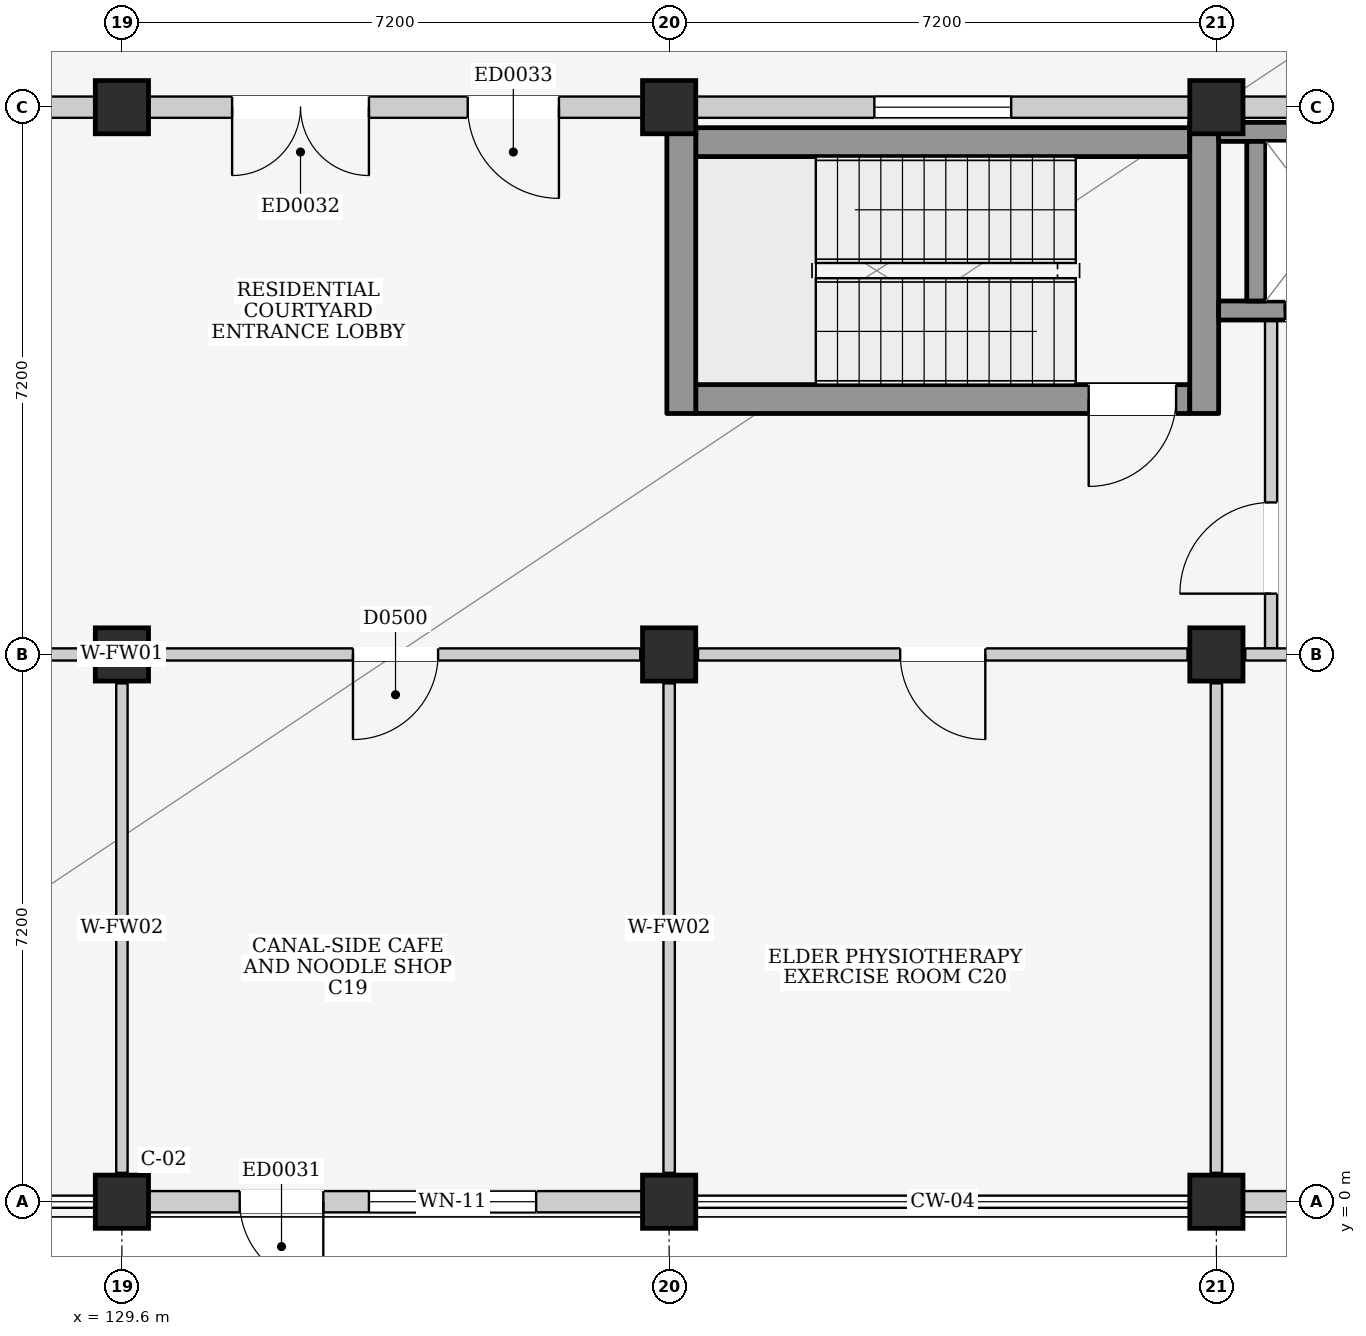
"""IFC4 building model, lengths in metres.
Left out: names, types, materials, properties, quantities, classifications, styles, units other than length and angle.
Written with IfcOpenShell. Run it as: python <this file> out.ifc"""

import sys

from ifc_helpers import new_model, si_unit, direction, frame, frame_2d, origin, origin_2d, place, context, subcontext, project, spatial, rectangle, extrude, element, fill, save


model = new_model("IFC4")
c1 = context("Model", 3, precision=1e-05, world=origin(), true_north=direction((0.0, 1.0)))
c2 = subcontext(c1, "Body", "Model", "MODEL_VIEW")
j1 = project(units=[si_unit("LENGTHUNIT", "METRE"), si_unit("PLANEANGLEUNIT", "RADIAN")], contexts=[c1])
p1 = place(None, origin())
s1 = spatial("IfcSite", under=j1, at=p1, CompositionType="ELEMENT")
p2 = place(p1, origin())
s2 = spatial("IfcBuilding", under=s1, at=p2, CompositionType="ELEMENT")
p3 = place(p2, origin())
s3 = spatial("IfcBuildingStorey", under=s2, at=p3, CompositionType="ELEMENT", Elevation=0.0)
for number, where, z_axis, x_axis in (
    (1, (129.6, 0.0, 0.0), (0.0, 0.0, 1.0), (1.0, 0.0, 0.0)),
    (2, (129.6, 7.2, 0.0), (0.0, 0.0, 1.0), (1.0, 0.0, 0.0)),
    (3, (129.6, 14.4, 0.0), (0.0, 0.0, 1.0), (1.0, 0.0, 0.0)),
    (4, (136.8, 0.0, 0.0), (0.0, 0.0, 1.0), (1.0, 0.0, 0.0)),
    (5, (136.8, 7.2, 0.0), (0.0, 0.0, 1.0), (1.0, 0.0, 0.0)),
    (6, (136.8, 14.4, 0.0), (0.0, 0.0, 1.0), (1.0, 0.0, 0.0)),
    (7, (144.0, 0.0, 0.0), (0.0, 0.0, 1.0), (1.0, 0.0, 0.0)),
    (8, (144.0, 7.2, 0.0), (0.0, 0.0, 1.0), (1.0, 0.0, 0.0)),
    (9, (144.0, 14.4, 0.0), (0.0, 0.0, 1.0), (1.0, 0.0, 0.0)),
):
    element("IfcColumn", number, at=place(p3, frame(where, z_axis=z_axis, x_axis=x_axis)), inside=s3, PredefinedType="COLUMN", context=c2, shape_type="SweptSolid", body=[
        extrude(rectangle(XDim=0.7, YDim=0.7, at=origin_2d()), origin(), (0.0, 0.0, 1.0), 4.5),
    ])
p4 = place(p3, frame((122.75, 14.4, 0.0), z_axis=(0.0, 0.0, 1.0), x_axis=(1.0, 0.0, 0.0)))
e10 = element("IfcWall", 10, at=p4, inside=s3, PredefinedType="ELEMENTEDWALL", context=c2, shape_type="SweptSolid", body=[
    extrude(rectangle(XDim=6.5, YDim=0.28, at=frame_2d((3.25, 0.0))), origin(), (0.0, 0.0, 1.0), 3.435),
])
p5 = place(p4, frame((2.225, 0.0, 0.95)))
e11 = element("IfcOpeningElement", 11, at=p5, cuts=e10, PredefinedType="OPENING", context=c2, shape_type="SweptSolid", body=[
    extrude(rectangle(XDim=2.05, YDim=1.6, at=frame_2d((1.025, 0.8))), frame((0.0, 0.155, 0.0), z_axis=(0.0, -1.0, 0.0), x_axis=(1.0, 0.0, 0.0)), (0.0, 0.0, 1.0), 0.31),
])
p6 = place(p3, frame((129.95, 0.0, 0.0), z_axis=(0.0, 0.0, 1.0), x_axis=(1.0, 0.0, 0.0)))
e12 = element("IfcWall", 12, at=p6, inside=s3, PredefinedType="ELEMENTEDWALL", context=c2, shape_type="SweptSolid", body=[
    extrude(rectangle(XDim=6.5, YDim=0.28, at=frame_2d((3.25, 0.0))), origin(), (0.0, 0.0, 1.0), 3.665),
])
p7 = place(p6, frame((1.2, 0.0, 0.0)))
e13 = element("IfcOpeningElement", 13, at=p7, cuts=e12, PredefinedType="OPENING", context=c2, shape_type="SweptSolid", body=[
    extrude(rectangle(XDim=1.1, YDim=2.2, at=frame_2d((0.55, 1.1))), frame((0.0, 0.155, 0.0), z_axis=(0.0, -1.0, 0.0), x_axis=(1.0, 0.0, 0.0)), (0.0, 0.0, 1.0), 0.31),
])
p8 = place(p6, frame((2.9, 0.0, 0.85)))
e14 = element("IfcOpeningElement", 14, at=p8, cuts=e12, PredefinedType="OPENING", context=c2, shape_type="SweptSolid", body=[
    extrude(rectangle(XDim=2.2, YDim=1.8, at=frame_2d((1.1, 0.9))), frame((0.0, 0.155, 0.0), z_axis=(0.0, -1.0, 0.0), x_axis=(1.0, 0.0, 0.0)), (0.0, 0.0, 1.0), 0.31),
])
p9 = place(p3, frame((129.95, 14.4, 0.0), z_axis=(0.0, 0.0, 1.0), x_axis=(1.0, 0.0, 0.0)))
e15 = element("IfcWall", 15, at=p9, inside=s3, PredefinedType="ELEMENTEDWALL", context=c2, shape_type="SweptSolid", body=[
    extrude(rectangle(XDim=6.5, YDim=0.28, at=frame_2d((3.25, 0.0))), origin(), (0.0, 0.0, 1.0), 3.435),
])
p10 = place(p9, frame((1.1, 0.0, 0.0)))
e16 = element("IfcOpeningElement", 16, at=p10, cuts=e15, PredefinedType="OPENING", context=c2, shape_type="SweptSolid", body=[
    extrude(rectangle(XDim=1.8, YDim=2.4, at=frame_2d((0.9, 1.2))), frame((0.0, 0.155, 0.0), z_axis=(0.0, -1.0, 0.0), x_axis=(1.0, 0.0, 0.0)), (0.0, 0.0, 1.0), 0.31),
])
p11 = place(p9, frame((4.2, 0.0, 0.0)))
e17 = element("IfcOpeningElement", 17, at=p11, cuts=e15, PredefinedType="OPENING", context=c2, shape_type="SweptSolid", body=[
    extrude(rectangle(XDim=1.2, YDim=2.15, at=frame_2d((0.6, 1.075))), frame((0.0, 0.155, 0.0), z_axis=(0.0, -1.0, 0.0), x_axis=(1.0, 0.0, 0.0)), (0.0, 0.0, 1.0), 0.31),
])
p12 = place(p3, frame((137.15, 14.4, 0.0), z_axis=(0.0, 0.0, 1.0), x_axis=(1.0, 0.0, 0.0)))
e18 = element("IfcWall", 18, at=p12, inside=s3, PredefinedType="ELEMENTEDWALL", context=c2, shape_type="SweptSolid", body=[
    extrude(rectangle(XDim=6.5, YDim=0.28, at=frame_2d((3.25, 0.0))), origin(), (0.0, 0.0, 1.0), 3.435),
])
p13 = place(p12, frame((2.35, 0.0, 0.95)))
e19 = element("IfcOpeningElement", 19, at=p13, cuts=e18, PredefinedType="OPENING", context=c2, shape_type="SweptSolid", body=[
    extrude(rectangle(XDim=1.8, YDim=1.5, at=frame_2d((0.9, 0.75))), frame((0.0, 0.155, 0.0), z_axis=(0.0, -1.0, 0.0), x_axis=(1.0, 0.0, 0.0)), (0.0, 0.0, 1.0), 0.31),
])
p14 = place(p3, frame((144.35, 0.0, 0.0), z_axis=(0.0, 0.0, 1.0), x_axis=(1.0, 0.0, 0.0)))
e20 = element("IfcWall", 20, at=p14, inside=s3, PredefinedType="ELEMENTEDWALL", context=c2, shape_type="SweptSolid", body=[
    extrude(rectangle(XDim=6.5, YDim=0.28, at=frame_2d((3.25, 0.0))), origin(), (0.0, 0.0, 1.0), 3.665),
])
p15 = place(p14, frame((2.35, 0.0, 0.95)))
e21 = element("IfcOpeningElement", 21, at=p15, cuts=e20, PredefinedType="OPENING", context=c2, shape_type="SweptSolid", body=[
    extrude(rectangle(XDim=1.8, YDim=1.5, at=frame_2d((0.9, 0.75))), frame((0.0, 0.155, 0.0), z_axis=(0.0, -1.0, 0.0), x_axis=(1.0, 0.0, 0.0)), (0.0, 0.0, 1.0), 0.31),
])
p16 = place(p3, frame((144.35, 14.4, 0.0), z_axis=(0.0, 0.0, 1.0), x_axis=(1.0, 0.0, 0.0)))
e22 = element("IfcWall", 22, at=p16, inside=s3, PredefinedType="ELEMENTEDWALL", context=c2, shape_type="SweptSolid", body=[
    extrude(rectangle(XDim=6.5, YDim=0.28, at=frame_2d((3.25, 0.0))), origin(), (0.0, 0.0, 1.0), 3.435),
])
p17 = place(p16, frame((2.5, 0.0, 0.95)))
e23 = element("IfcOpeningElement", 23, at=p17, cuts=e22, PredefinedType="OPENING", context=c2, shape_type="SweptSolid", body=[
    extrude(rectangle(XDim=1.5, YDim=1.5, at=frame_2d((0.75, 0.75))), frame((0.0, 0.155, 0.0), z_axis=(0.0, -1.0, 0.0), x_axis=(1.0, 0.0, 0.0)), (0.0, 0.0, 1.0), 0.31),
])
p18 = place(p3, frame((137.15, 10.56, 0.0), z_axis=(0.0, 0.0, 1.0), x_axis=(1.0, 0.0, 0.0)))
e24 = element("IfcWall", 24, at=p18, inside=s3, PredefinedType="SHEAR", context=c2, shape_type="SweptSolid", body=[
    extrude(rectangle(XDim=6.5, YDim=0.38, at=frame_2d((3.25, 0.0))), origin(), (0.0, 0.0, 1.0), 4.2),
])
p19 = place(p18, frame((5.17, 0.0, 0.0)))
e25 = element("IfcOpeningElement", 25, at=p19, cuts=e24, PredefinedType="OPENING", context=c2, shape_type="SweptSolid", body=[
    extrude(rectangle(XDim=1.15, YDim=2.2, at=frame_2d((0.575, 1.1))), frame((0.0, 0.205, 0.0), z_axis=(0.0, -1.0, 0.0), x_axis=(1.0, 0.0, 0.0)), (0.0, 0.0, 1.0), 0.41),
])
p20 = place(p3, frame((137.15, 13.94, 0.0), z_axis=(0.0, 0.0, 1.0), x_axis=(1.0, 0.0, 0.0)))
e26 = element("IfcWall", 26, at=p20, inside=s3, PredefinedType="SHEAR", context=c2, shape_type="SweptSolid", body=[
    extrude(rectangle(XDim=6.5, YDim=0.38, at=frame_2d((3.25, 0.0))), origin(), (0.0, 0.0, 1.0), 4.2),
])
p21 = place(p3, frame((136.96, 10.37, 0.0), z_axis=(0.0, 0.0, 1.0), x_axis=(0.0, 1.0, 0.0)))
e27 = element("IfcWall", 27, at=p21, inside=s3, PredefinedType="SHEAR", context=c2, shape_type="SweptSolid", body=[
    extrude(rectangle(XDim=3.76, YDim=0.38, at=frame_2d((1.88, 0.0))), origin(), (0.0, 0.0, 1.0), 4.2),
])
p22 = place(p3, frame((143.84, 10.37, 0.0), z_axis=(0.0, 0.0, 1.0), x_axis=(0.0, 1.0, 0.0)))
e28 = element("IfcWall", 28, at=p22, inside=s3, PredefinedType="SHEAR", context=c2, shape_type="SweptSolid", body=[
    extrude(rectangle(XDim=3.83, YDim=0.38, at=frame_2d((1.915, 0.0))), origin(), (0.0, 0.0, 1.0), 4.2),
])
p23 = place(p3, frame((144.72, 7.28, 0.0), z_axis=(0.0, 0.0, 1.0), x_axis=(0.0, 1.0, 0.0)))
e29 = element("IfcWall", 29, at=p23, inside=s3, PredefinedType="PARTITIONING", context=c2, shape_type="SweptSolid", body=[
    extrude(rectangle(XDim=4.32, YDim=0.16, at=frame_2d((2.16, 0.0))), origin(), (0.0, 0.0, 1.0), 4.2),
])
p24 = place(p23, frame((0.72, 0.0, 0.0)))
e30 = element("IfcOpeningElement", 30, at=p24, cuts=e29, PredefinedType="OPENING", context=c2, shape_type="SweptSolid", body=[
    extrude(rectangle(XDim=1.2, YDim=2.2, at=frame_2d((0.6, 1.1))), frame((0.0, 0.095, 0.0), z_axis=(0.0, -1.0, 0.0), x_axis=(1.0, 0.0, 0.0)), (0.0, 0.0, 1.0), 0.19),
])
p25 = place(p3, frame((144.03, 11.725, 0.0), z_axis=(0.0, 0.0, 1.0), x_axis=(1.0, 0.0, 0.0)))
e31 = element("IfcWall", 31, at=p25, inside=s3, PredefinedType="SHEAR", context=c2, shape_type="SweptSolid", body=[
    extrude(rectangle(XDim=2.47, YDim=0.25, at=frame_2d((1.235, 0.0))), origin(), (0.0, 0.0, 1.0), 4.2),
])
p26 = place(p25, frame((0.87, 0.0, 0.0)))
e32 = element("IfcOpeningElement", 32, at=p26, cuts=e31, PredefinedType="OPENING", context=c2, shape_type="SweptSolid", body=[
    extrude(rectangle(XDim=1.1, YDim=2.15, at=frame_2d((0.55, 1.075))), frame((0.0, 0.14, 0.0), z_axis=(0.0, -1.0, 0.0), x_axis=(1.0, 0.0, 0.0)), (0.0, 0.0, 1.0), 0.28),
])
p27 = place(p3, frame((144.03, 14.075, 0.0), z_axis=(0.0, 0.0, 1.0), x_axis=(1.0, 0.0, 0.0)))
e33 = element("IfcWall", 33, at=p27, inside=s3, PredefinedType="SHEAR", context=c2, shape_type="SweptSolid", body=[
    extrude(rectangle(XDim=2.47, YDim=0.25, at=frame_2d((1.235, 0.0))), origin(), (0.0, 0.0, 1.0), 4.2),
])
p28 = place(p3, frame((144.525, 11.85, 0.0), z_axis=(0.0, 0.0, 1.0), x_axis=(0.0, 1.0, 0.0)))
e34 = element("IfcWall", 34, at=p28, inside=s3, PredefinedType="SHEAR", context=c2, shape_type="SweptSolid", body=[
    extrude(rectangle(XDim=2.1, YDim=0.25, at=frame_2d((1.05, 0.0))), origin(), (0.0, 0.0, 1.0), 4.2),
])
p29 = place(p3, frame((122.78, 7.2, 0.0), z_axis=(0.0, 0.0, 1.0), x_axis=(1.0, 0.0, 0.0)))
e35 = element("IfcWall", 35, at=p29, inside=s3, PredefinedType="PARTITIONING", context=c2, shape_type="SweptSolid", body=[
    extrude(rectangle(XDim=6.44, YDim=0.16, at=frame_2d((3.22, 0.0))), origin(), (0.0, 0.0, 1.0), 3.435),
])
p30 = place(p29, frame((2.76, 0.0, 0.0)))
e36 = element("IfcOpeningElement", 36, at=p30, cuts=e35, PredefinedType="OPENING", context=c2, shape_type="SweptSolid", body=[
    extrude(rectangle(XDim=1.12, YDim=2.2, at=frame_2d((0.56, 1.1))), frame((0.0, 0.095, 0.0), z_axis=(0.0, -1.0, 0.0), x_axis=(1.0, 0.0, 0.0)), (0.0, 0.0, 1.0), 0.19),
])
p31 = place(p3, frame((129.6, 0.38, 0.0), z_axis=(0.0, 0.0, 1.0), x_axis=(0.0, 1.0, 0.0)))
e37 = element("IfcWall", 37, at=p31, inside=s3, PredefinedType="PARTITIONING", context=c2, shape_type="SweptSolid", body=[
    extrude(rectangle(XDim=6.44, YDim=0.15, at=frame_2d((3.22, 0.0))), origin(), (0.0, 0.0, 1.0), 3.435),
])
p32 = place(p3, frame((129.98, 7.2, 0.0), z_axis=(0.0, 0.0, 1.0), x_axis=(1.0, 0.0, 0.0)))
e38 = element("IfcWall", 38, at=p32, inside=s3, PredefinedType="PARTITIONING", context=c2, shape_type="SweptSolid", body=[
    extrude(rectangle(XDim=6.44, YDim=0.16, at=frame_2d((3.22, 0.0))), origin(), (0.0, 0.0, 1.0), 3.435),
])
p33 = place(p32, frame((2.66, 0.0, 0.0)))
e39 = element("IfcOpeningElement", 39, at=p33, cuts=e38, PredefinedType="OPENING", context=c2, shape_type="SweptSolid", body=[
    extrude(rectangle(XDim=1.12, YDim=2.2, at=frame_2d((0.56, 1.1))), frame((0.0, 0.095, 0.0), z_axis=(0.0, -1.0, 0.0), x_axis=(1.0, 0.0, 0.0)), (0.0, 0.0, 1.0), 0.19),
])
p34 = place(p3, frame((136.8, 0.38, 0.0), z_axis=(0.0, 0.0, 1.0), x_axis=(0.0, 1.0, 0.0)))
e40 = element("IfcWall", 40, at=p34, inside=s3, PredefinedType="PARTITIONING", context=c2, shape_type="SweptSolid", body=[
    extrude(rectangle(XDim=6.44, YDim=0.15, at=frame_2d((3.22, 0.0))), origin(), (0.0, 0.0, 1.0), 3.435),
])
p35 = place(p3, frame((137.18, 7.2, 0.0), z_axis=(0.0, 0.0, 1.0), x_axis=(1.0, 0.0, 0.0)))
e41 = element("IfcWall", 41, at=p35, inside=s3, PredefinedType="PARTITIONING", context=c2, shape_type="SweptSolid", body=[
    extrude(rectangle(XDim=6.44, YDim=0.16, at=frame_2d((3.22, 0.0))), origin(), (0.0, 0.0, 1.0), 3.435),
])
p36 = place(p35, frame((2.66, 0.0, 0.0)))
e42 = element("IfcOpeningElement", 42, at=p36, cuts=e41, PredefinedType="OPENING", context=c2, shape_type="SweptSolid", body=[
    extrude(rectangle(XDim=1.12, YDim=2.2, at=frame_2d((0.56, 1.1))), frame((0.0, 0.095, 0.0), z_axis=(0.0, -1.0, 0.0), x_axis=(1.0, 0.0, 0.0)), (0.0, 0.0, 1.0), 0.19),
])
p37 = place(p3, frame((144.0, 0.38, 0.0), z_axis=(0.0, 0.0, 1.0), x_axis=(0.0, 1.0, 0.0)))
e43 = element("IfcWall", 43, at=p37, inside=s3, PredefinedType="PARTITIONING", context=c2, shape_type="SweptSolid", body=[
    extrude(rectangle(XDim=6.44, YDim=0.15, at=frame_2d((3.22, 0.0))), origin(), (0.0, 0.0, 1.0), 3.435),
])
p38 = place(p3, frame((144.38, 7.2, 0.0), z_axis=(0.0, 0.0, 1.0), x_axis=(1.0, 0.0, 0.0)))
e44 = element("IfcWall", 44, at=p38, inside=s3, PredefinedType="PARTITIONING", context=c2, shape_type="SweptSolid", body=[
    extrude(rectangle(XDim=6.44, YDim=0.16, at=frame_2d((3.22, 0.0))), origin(), (0.0, 0.0, 1.0), 3.435),
])
p39 = place(p38, frame((2.66, 0.0, 0.0)))
e45 = element("IfcOpeningElement", 45, at=p39, cuts=e44, PredefinedType="OPENING", context=c2, shape_type="SweptSolid", body=[
    extrude(rectangle(XDim=1.12, YDim=2.2, at=frame_2d((0.56, 1.1))), frame((0.0, 0.095, 0.0), z_axis=(0.0, -1.0, 0.0), x_axis=(1.0, 0.0, 0.0)), (0.0, 0.0, 1.0), 0.19),
])
p40 = place(p7, frame((1.1, 0.0, 0.0), z_axis=(0.0, 0.0, 1.0), x_axis=(-1.0, 0.0, 0.0)))
e46 = element("IfcDoor", 46, at=p40, inside=s3, OperationType="SINGLE_SWING_LEFT", PredefinedType="DOOR", context=c2, shape_type="SweptSolid", body=[
    extrude(rectangle(XDim=1.1, YDim=2.2, at=frame_2d((0.55, 1.1))), frame((0.0, 0.025, 0.0), z_axis=(0.0, -1.0, 0.0), x_axis=(1.0, 0.0, 0.0)), (0.0, 0.0, 1.0), 0.05),
])
fill(e13, e46)
p41 = place(p8, origin())
e47 = element("IfcWindow", 47, at=p41, inside=s3, PartitioningType="TRIPLE_PANEL_VERTICAL", PredefinedType="WINDOW", context=c2, shape_type="SweptSolid", body=[
    extrude(rectangle(XDim=2.2, YDim=1.8, at=frame_2d((1.1, 0.9))), frame((0.0, 0.03, 0.0), z_axis=(0.0, -1.0, 0.0), x_axis=(1.0, 0.0, 0.0)), (0.0, 0.0, 1.0), 0.06),
])
fill(e14, e47)
p42 = place(p10, frame((1.8, 0.0, 0.0), z_axis=(0.0, 0.0, 1.0), x_axis=(-1.0, 0.0, 0.0)))
e48 = element("IfcDoor", 48, at=p42, inside=s3, OperationType="DOUBLE_DOOR_SINGLE_SWING", PredefinedType="DOOR", context=c2, shape_type="SweptSolid", body=[
    extrude(rectangle(XDim=1.8, YDim=2.4, at=frame_2d((0.9, 1.2))), frame((0.0, 0.025, 0.0), z_axis=(0.0, -1.0, 0.0), x_axis=(1.0, 0.0, 0.0)), (0.0, 0.0, 1.0), 0.05),
])
fill(e16, e48)
p43 = place(p11, frame((1.2, 0.0, 0.0), z_axis=(0.0, 0.0, 1.0), x_axis=(-1.0, 0.0, 0.0)))
e49 = element("IfcDoor", 49, at=p43, inside=s3, OperationType="SINGLE_SWING_LEFT", PredefinedType="DOOR", context=c2, shape_type="SweptSolid", body=[
    extrude(rectangle(XDim=1.2, YDim=2.15, at=frame_2d((0.6, 1.075))), frame((0.0, 0.025, 0.0), z_axis=(0.0, -1.0, 0.0), x_axis=(1.0, 0.0, 0.0)), (0.0, 0.0, 1.0), 0.05),
])
fill(e17, e49)
p44 = place(p13, origin())
e50 = element("IfcWindow", 50, at=p44, inside=s3, PartitioningType="DOUBLE_PANEL_VERTICAL", PredefinedType="WINDOW", context=c2, shape_type="SweptSolid", body=[
    extrude(rectangle(XDim=1.8, YDim=1.5, at=frame_2d((0.9, 0.75))), frame((0.0, 0.03, 0.0), z_axis=(0.0, -1.0, 0.0), x_axis=(1.0, 0.0, 0.0)), (0.0, 0.0, 1.0), 0.06),
])
fill(e19, e50)
p45 = place(p19, frame((1.15, 0.0, 0.0), z_axis=(0.0, 0.0, 1.0), x_axis=(-1.0, 0.0, 0.0)))
e51 = element("IfcDoor", 51, at=p45, inside=s3, OperationType="SINGLE_SWING_RIGHT", PredefinedType="DOOR", context=c2, shape_type="SweptSolid", body=[
    extrude(rectangle(XDim=1.15, YDim=2.2, at=frame_2d((0.575, 1.1))), frame((0.0, 0.025, 0.0), z_axis=(0.0, -1.0, 0.0), x_axis=(1.0, 0.0, 0.0)), (0.0, 0.0, 1.0), 0.05),
])
fill(e25, e51)
p46 = place(p24, origin())
e52 = element("IfcDoor", 52, at=p46, inside=s3, OperationType="SINGLE_SWING_LEFT", PredefinedType="DOOR", context=c2, shape_type="SweptSolid", body=[
    extrude(rectangle(XDim=1.2, YDim=2.2, at=frame_2d((0.6, 1.1))), frame((0.0, 0.025, 0.0), z_axis=(0.0, -1.0, 0.0), x_axis=(1.0, 0.0, 0.0)), (0.0, 0.0, 1.0), 0.05),
])
fill(e30, e52)
p47 = place(p26, frame((1.1, 0.0, 0.0), z_axis=(0.0, 0.0, 1.0), x_axis=(-1.0, 0.0, 0.0)))
e53 = element("IfcDoor", 53, at=p47, inside=s3, OperationType="SLIDING_TO_LEFT", PredefinedType="DOOR", context=c2, shape_type="SweptSolid", body=[
    extrude(rectangle(XDim=1.1, YDim=2.15, at=frame_2d((0.55, 1.075))), frame((0.0, 0.025, 0.0), z_axis=(0.0, -1.0, 0.0), x_axis=(1.0, 0.0, 0.0)), (0.0, 0.0, 1.0), 0.05),
])
fill(e32, e53)
p48 = place(p33, frame((1.12, 0.0, 0.0), z_axis=(0.0, 0.0, 1.0), x_axis=(-1.0, 0.0, 0.0)))
e54 = element("IfcDoor", 54, at=p48, inside=s3, OperationType="SINGLE_SWING_RIGHT", PredefinedType="DOOR", context=c2, shape_type="SweptSolid", body=[
    extrude(rectangle(XDim=1.12, YDim=2.2, at=frame_2d((0.56, 1.1))), frame((0.0, 0.025, 0.0), z_axis=(0.0, -1.0, 0.0), x_axis=(1.0, 0.0, 0.0)), (0.0, 0.0, 1.0), 0.05),
])
fill(e39, e54)
p49 = place(p36, frame((1.12, 0.0, 0.0), z_axis=(0.0, 0.0, 1.0), x_axis=(-1.0, 0.0, 0.0)))
e55 = element("IfcDoor", 55, at=p49, inside=s3, OperationType="SINGLE_SWING_LEFT", PredefinedType="DOOR", context=c2, shape_type="SweptSolid", body=[
    extrude(rectangle(XDim=1.12, YDim=2.2, at=frame_2d((0.56, 1.1))), frame((0.0, 0.025, 0.0), z_axis=(0.0, -1.0, 0.0), x_axis=(1.0, 0.0, 0.0)), (0.0, 0.0, 1.0), 0.05),
])
fill(e42, e55)
save(model, sys.argv[1])
